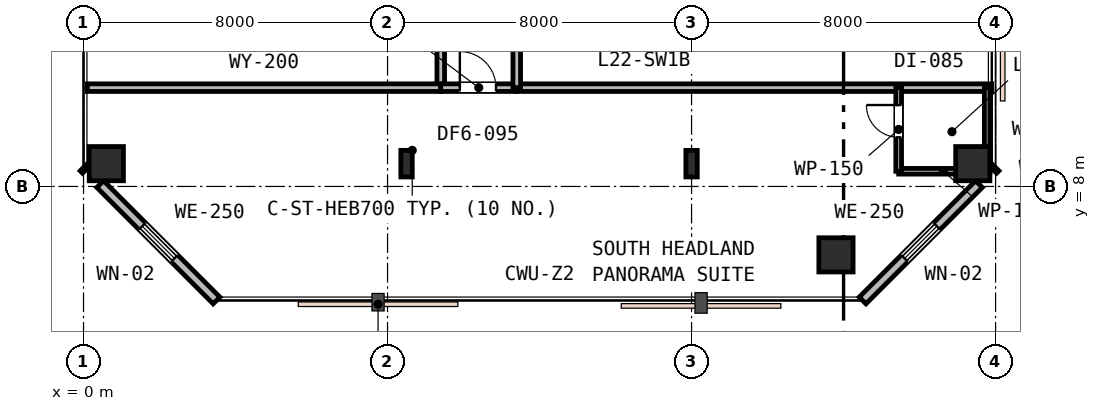
"""IFC4 building model, lengths in metres.
Left out: names, types, materials, properties, quantities, classifications, styles, units other than length and angle.
Written with IfcOpenShell. Run it as: python <this file> out.ifc"""

import sys

from ifc_helpers import new_model, si_unit, direction, frame, frame_2d, origin, origin_2d, place, context, subcontext, project, spatial, rectangle, i_section, extrude, element, fill, save


model = new_model("IFC4")
c1 = context("Model", 3, precision=1e-05, world=origin(), true_north=direction((0.0, 1.0)))
c2 = subcontext(c1, "Body", "Model", "MODEL_VIEW")
j1 = project(units=[si_unit("LENGTHUNIT", "METRE"), si_unit("PLANEANGLEUNIT", "RADIAN")], contexts=[c1])
p1 = place(None, origin())
s1 = spatial("IfcSite", under=j1, at=p1, CompositionType="ELEMENT")
p2 = place(p1, origin())
s2 = spatial("IfcBuilding", under=s1, at=p2, CompositionType="ELEMENT")
p3 = place(p2, frame((0.0, 0.0, 90.0)))
s3 = spatial("IfcBuildingStorey", under=s2, at=p3, CompositionType="ELEMENT", Elevation=90.0)
for number, where, z_axis, x_axis in (
    (1, (0.6, 8.6, 0.0), (0.0, 0.0, 1.0), (1.0, 0.0, 0.0)),
    (2, (19.8, 6.2, 0.0), (0.0, 0.0, 1.0), (1.0, 0.0, 0.0)),
    (3, (23.4, 8.6, 0.0), (0.0, 0.0, 1.0), (1.0, 0.0, 0.0)),
):
    element("IfcColumn", number, at=place(p3, frame(where, z_axis=z_axis, x_axis=x_axis)), inside=s3, PredefinedType="COLUMN", context=c2, shape_type="SweptSolid", body=[
        extrude(rectangle(XDim=0.9, YDim=0.9, at=origin_2d()), origin(), (0.0, 0.0, 1.0), 3.6),
    ])
for number, where, z_axis, x_axis in (
    (4, (8.5, 8.6, 0.0), (0.0, 0.0, 1.0), (1.0, 0.0, 0.0)),
    (5, (16.0, 8.6, 0.0), (0.0, 0.0, 1.0), (1.0, 0.0, 0.0)),
):
    element("IfcColumn", number, at=place(p3, frame(where, z_axis=z_axis, x_axis=x_axis)), inside=s3, PredefinedType="COLUMN", context=c2, shape_type="SweptSolid", body=[
        extrude(i_section(OverallWidth=0.3, OverallDepth=0.7, WebThickness=0.017, FlangeThickness=0.032, FilletRadius=0.027, at=origin_2d()), origin(), (0.0, 0.0, 1.0), 3.6),
    ])
p4 = place(p3, frame((20.5, 5.0, 0.0), z_axis=(0.0, 0.0, 1.0), x_axis=(0.707106781187, 0.707106781187, 0.0)))
e6 = element("IfcWall", 6, at=p4, inside=s3, PredefinedType="STANDARD", context=c2, shape_type="SweptSolid", body=[
    extrude(rectangle(XDim=4.33, YDim=0.25, at=frame_2d((2.165, 0.0))), origin(), (0.0, 0.0, 1.0), 3.33),
])
p5 = place(p4, frame((1.565, 0.0, 0.85)))
e7 = element("IfcOpeningElement", 7, at=p5, cuts=e6, PredefinedType="OPENING", context=c2, shape_type="SweptSolid", body=[
    extrude(rectangle(XDim=1.2, YDim=1.6, at=frame_2d((0.6, 0.8))), frame((0.0, 0.135, 0.0), z_axis=(0.0, -1.0, 0.0), x_axis=(1.0, 0.0, 0.0)), (0.0, 0.0, 1.0), 0.27),
])
for number, where, z_axis, x_axis in (
    (8, (23.938, 8.438, 0.0), (0.0, 0.0, 1.0), (0.707, 0.707, 0.0)),
    (9, (0.0, 8.5, 0.0), (0.0, 0.0, 1.0), (0.707, -0.707, 0.0)),
):
    element("IfcWall", number, at=place(p3, frame(where, z_axis=z_axis, x_axis=x_axis)), inside=s3, PredefinedType="STANDARD", context=c2, shape_type="SweptSolid", body=[
        extrude(rectangle(XDim=0.087, YDim=0.25, at=frame_2d((0.044, 0.0))), origin(), (0.0, 0.0, 1.0), 3.33),
    ])
p6 = place(p3, frame((0.438, 8.062, 0.0), z_axis=(0.0, 0.0, 1.0), x_axis=(0.707106781187, -0.707106781187, 0.0)))
e10 = element("IfcWall", 10, at=p6, inside=s3, PredefinedType="STANDARD", context=c2, shape_type="SweptSolid", body=[
    extrude(rectangle(XDim=4.33, YDim=0.25, at=frame_2d((2.165, 0.0))), origin(), (0.0, 0.0, 1.0), 3.33),
])
p7 = place(p6, frame((1.565, 0.0, 0.85)))
e11 = element("IfcOpeningElement", 11, at=p7, cuts=e10, PredefinedType="OPENING", context=c2, shape_type="SweptSolid", body=[
    extrude(rectangle(XDim=1.2, YDim=1.6, at=frame_2d((0.6, 0.8))), frame((0.0, 0.135, 0.0), z_axis=(0.0, -1.0, 0.0), x_axis=(1.0, 0.0, 0.0)), (0.0, 0.0, 1.0), 0.27),
])
p8 = place(p3, frame((9.4, 10.6, 0.0), z_axis=(0.0, 0.0, 1.0), x_axis=(0.0, 1.0, 0.0)))
e12 = element("IfcWall", 12, at=p8, inside=s3, PredefinedType="PARTITIONING", context=c2, shape_type="SweptSolid", body=[
    extrude(rectangle(XDim=30.9, YDim=0.2, at=frame_2d((15.45, 0.0))), origin(), (0.0, 0.0, 1.0), 2.83),
])
p9 = place(p8, frame((8.679, 0.0, 0.0)))
e13 = element("IfcOpeningElement", 13, at=p9, cuts=e12, PredefinedType="OPENING", context=c2, shape_type="SweptSolid", body=[
    extrude(rectangle(XDim=0.95, YDim=2.15, at=frame_2d((0.475, 1.075))), frame((0.0, 0.11, 0.0), z_axis=(0.0, -1.0, 0.0), x_axis=(1.0, 0.0, 0.0)), (0.0, 0.0, 1.0), 0.22),
])
p10 = place(p8, frame((14.68, 0.0, 0.0)))
e14 = element("IfcOpeningElement", 14, at=p10, cuts=e12, PredefinedType="OPENING", context=c2, shape_type="SweptSolid", body=[
    extrude(rectangle(XDim=0.95, YDim=2.15, at=frame_2d((0.475, 1.075))), frame((0.0, 0.11, 0.0), z_axis=(0.0, -1.0, 0.0), x_axis=(1.0, 0.0, 0.0)), (0.0, 0.0, 1.0), 0.22),
])
p11 = place(p8, frame((4.273, 0.0, 0.0)))
e15 = element("IfcOpeningElement", 15, at=p11, cuts=e12, PredefinedType="OPENING", context=c2, shape_type="SweptSolid", body=[
    extrude(rectangle(XDim=0.95, YDim=2.15, at=frame_2d((0.475, 1.075))), frame((0.0, 0.11, 0.0), z_axis=(0.0, -1.0, 0.0), x_axis=(1.0, 0.0, 0.0)), (0.0, 0.0, 1.0), 0.22),
])
p12 = place(p8, frame((25.745, 0.0, 0.0)))
e16 = element("IfcOpeningElement", 16, at=p12, cuts=e12, PredefinedType="OPENING", context=c2, shape_type="SweptSolid", body=[
    extrude(rectangle(XDim=0.95, YDim=2.15, at=frame_2d((0.475, 1.075))), frame((0.0, 0.11, 0.0), z_axis=(0.0, -1.0, 0.0), x_axis=(1.0, 0.0, 0.0)), (0.0, 0.0, 1.0), 0.22),
])
p13 = place(p3, frame((0.1, 10.6, 0.0), z_axis=(0.0, 0.0, 1.0), x_axis=(1.0, 0.0, 0.0)))
e17 = element("IfcWall", 17, at=p13, inside=s3, PredefinedType="PARTITIONING", context=c2, shape_type="SweptSolid", body=[
    extrude(rectangle(XDim=9.3, YDim=0.2, at=frame_2d((4.65, 0.0))), origin(), (0.0, 0.0, 1.0), 2.83),
])
p14 = place(p3, frame((11.4, 10.6, 0.0), z_axis=(0.0, 0.0, 1.0), x_axis=(1.0, 0.0, 0.0)))
e18 = element("IfcWall", 18, at=p14, inside=s3, PredefinedType="PARTITIONING", context=c2, shape_type="SweptSolid", body=[
    extrude(rectangle(XDim=12.5, YDim=0.2, at=frame_2d((6.25, 0.0))), origin(), (0.0, 0.0, 1.0), 2.83),
])
p15 = place(p3, frame((9.4, 10.6, 0.0), z_axis=(0.0, 0.0, 1.0), x_axis=(1.0, 0.0, 0.0)))
e19 = element("IfcWall", 19, at=p15, inside=s3, PredefinedType="PARTITIONING", context=c2, shape_type="SweptSolid", body=[
    extrude(rectangle(XDim=2.0, YDim=0.2, at=frame_2d((1.0, 0.0))), origin(), (0.0, 0.0, 1.0), 3.02),
])
p16 = place(p15, frame((0.502, 0.0, 0.0)))
e20 = element("IfcOpeningElement", 20, at=p16, cuts=e19, PredefinedType="OPENING", context=c2, shape_type="SweptSolid", body=[
    extrude(rectangle(XDim=0.95, YDim=2.15, at=frame_2d((0.475, 1.075))), frame((0.0, 0.11, 0.0), z_axis=(0.0, -1.0, 0.0), x_axis=(1.0, 0.0, 0.0)), (0.0, 0.0, 1.0), 0.22),
])
p17 = place(p3, frame((21.45, 8.4, 0.0), z_axis=(0.0, 0.0, 1.0), x_axis=(1.0, 0.0, 0.0)))
e21 = element("IfcWall", 21, at=p17, inside=s3, PredefinedType="PARTITIONING", context=c2, shape_type="SweptSolid", body=[
    extrude(rectangle(XDim=2.35, YDim=0.15, at=frame_2d((1.175, 0.0))), origin(), (0.0, 0.0, 1.0), 2.83),
])
p18 = place(p3, frame((21.45, 8.4, 0.0), z_axis=(0.0, 0.0, 1.0), x_axis=(0.0, 1.0, 0.0)))
e22 = element("IfcWall", 22, at=p18, inside=s3, PredefinedType="PARTITIONING", context=c2, shape_type="SweptSolid", body=[
    extrude(rectangle(XDim=2.2, YDim=0.15, at=frame_2d((1.1, 0.0))), origin(), (0.0, 0.0, 1.0), 2.83),
])
p19 = place(p18, frame((0.892, 0.0, 0.0)))
e23 = element("IfcOpeningElement", 23, at=p19, cuts=e22, PredefinedType="OPENING", context=c2, shape_type="SweptSolid", body=[
    extrude(rectangle(XDim=0.85, YDim=2.15, at=frame_2d((0.425, 1.075))), frame((0.0, 0.085, 0.0), z_axis=(0.0, -1.0, 0.0), x_axis=(1.0, 0.0, 0.0)), (0.0, 0.0, 1.0), 0.17),
])
p20 = place(p3, frame((23.78, 10.6, 0.0), z_axis=(0.0, 0.0, 1.0), x_axis=(0.0, -1.0, 0.0)))
e24 = element("IfcWall", 24, at=p20, inside=s3, PredefinedType="PARTITIONING", context=c2, shape_type="SweptSolid", body=[
    extrude(rectangle(XDim=2.22, YDim=0.15, at=frame_2d((1.11, 0.0))), origin(), (0.0, 0.0, 1.0), 2.83),
])
p21 = place(p3, frame((11.4, 10.6, 0.0), z_axis=(0.0, 0.0, 1.0), x_axis=(0.0, 1.0, 0.0)))
e25 = element("IfcWall", 25, at=p21, inside=s3, PredefinedType="PARTITIONING", context=c2, shape_type="SweptSolid", body=[
    extrude(rectangle(XDim=18.0, YDim=0.2, at=frame_2d((9.0, 0.0))), origin(), (0.0, 0.0, 1.0), 2.83),
])
p22 = place(p21, frame((1.29, 0.0, 0.0)))
e26 = element("IfcOpeningElement", 26, at=p22, cuts=e25, PredefinedType="OPENING", context=c2, shape_type="SweptSolid", body=[
    extrude(rectangle(XDim=0.95, YDim=2.15, at=frame_2d((0.475, 1.075))), frame((0.0, 0.11, 0.0), z_axis=(0.0, -1.0, 0.0), x_axis=(1.0, 0.0, 0.0)), (0.0, 0.0, 1.0), 0.22),
])
p23 = place(p21, frame((7.29, 0.0, 0.0)))
e27 = element("IfcOpeningElement", 27, at=p23, cuts=e25, PredefinedType="OPENING", context=c2, shape_type="SweptSolid", body=[
    extrude(rectangle(XDim=0.95, YDim=2.15, at=frame_2d((0.475, 1.075))), frame((0.0, 0.11, 0.0), z_axis=(0.0, -1.0, 0.0), x_axis=(1.0, 0.0, 0.0)), (0.0, 0.0, 1.0), 0.22),
])
p24 = place(p21, frame((13.29, 0.0, 0.0)))
e28 = element("IfcOpeningElement", 28, at=p24, cuts=e25, PredefinedType="OPENING", context=c2, shape_type="SweptSolid", body=[
    extrude(rectangle(XDim=0.95, YDim=2.15, at=frame_2d((0.475, 1.075))), frame((0.0, 0.11, 0.0), z_axis=(0.0, -1.0, 0.0), x_axis=(1.0, 0.0, 0.0)), (0.0, 0.0, 1.0), 0.22),
])
p25 = place(p5, origin())
e29 = element("IfcWindow", 29, at=p25, inside=s3, PartitioningType="SINGLE_PANEL", PredefinedType="WINDOW", context=c2, shape_type="SweptSolid", body=[
    extrude(rectangle(XDim=1.2, YDim=1.6, at=frame_2d((0.6, 0.8))), frame((0.0, 0.03, 0.0), z_axis=(0.0, -1.0, 0.0), x_axis=(1.0, 0.0, 0.0)), (0.0, 0.0, 1.0), 0.06),
])
fill(e7, e29)
p26 = place(p7, origin())
e30 = element("IfcWindow", 30, at=p26, inside=s3, PartitioningType="SINGLE_PANEL", PredefinedType="WINDOW", context=c2, shape_type="SweptSolid", body=[
    extrude(rectangle(XDim=1.2, YDim=1.6, at=frame_2d((0.6, 0.8))), frame((0.0, 0.03, 0.0), z_axis=(0.0, -1.0, 0.0), x_axis=(1.0, 0.0, 0.0)), (0.0, 0.0, 1.0), 0.06),
])
fill(e11, e30)
p27 = place(p16, origin())
e31 = element("IfcDoor", 31, at=p27, inside=s3, OperationType="SINGLE_SWING_LEFT", PredefinedType="DOOR", context=c2, shape_type="SweptSolid", body=[
    extrude(rectangle(XDim=0.95, YDim=2.15, at=frame_2d((0.475, 1.075))), frame((0.0, 0.025, 0.0), z_axis=(0.0, -1.0, 0.0), x_axis=(1.0, 0.0, 0.0)), (0.0, 0.0, 1.0), 0.05),
])
fill(e20, e31)
p28 = place(p19, origin())
e32 = element("IfcDoor", 32, at=p28, inside=s3, OperationType="SINGLE_SWING_RIGHT", PredefinedType="DOOR", context=c2, shape_type="SweptSolid", body=[
    extrude(rectangle(XDim=0.85, YDim=2.15, at=frame_2d((0.425, 1.075))), frame((0.0, 0.025, 0.0), z_axis=(0.0, -1.0, 0.0), x_axis=(1.0, 0.0, 0.0)), (0.0, 0.0, 1.0), 0.05),
])
fill(e23, e32)
save(model, sys.argv[1])
